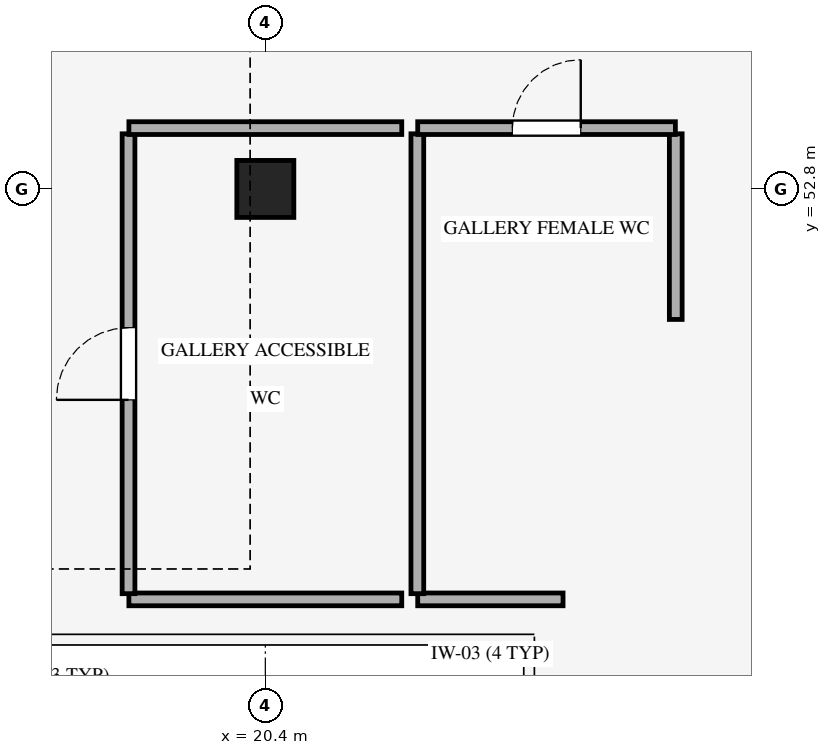
"""IFC4 building model, lengths in metres.
Left out: names, types, materials, properties, quantities, classifications, styles, units other than length and angle.
Written with IfcOpenShell. Run it as: python <this file> out.ifc"""

import sys

from ifc_helpers import new_model, si_unit, direction, frame, frame_2d, origin, origin_2d, place, context, subcontext, project, spatial, rectangle, extrude, element, fill, save


model = new_model("IFC4")
c1 = context("Model", 3, precision=1e-05, world=origin(), true_north=direction((0.0, 1.0)))
c2 = subcontext(c1, "Body", "Model", "MODEL_VIEW")
j1 = project(units=[si_unit("LENGTHUNIT", "METRE"), si_unit("PLANEANGLEUNIT", "RADIAN")], contexts=[c1])
p1 = place(None, origin())
s1 = spatial("IfcSite", under=j1, at=p1, CompositionType="ELEMENT")
p2 = place(p1, origin())
s2 = spatial("IfcBuilding", under=s1, at=p2, CompositionType="ELEMENT")
p3 = place(p2, frame((0.0, 0.0, 4.8)))
s3 = spatial("IfcBuildingStorey", under=s2, at=p3, CompositionType="ELEMENT", Elevation=4.8)
p4 = place(p3, frame((20.4, 52.8, 0.0), z_axis=(0.0, 0.0, 1.0), x_axis=(1.0, 0.0, 0.0)))
e1 = element("IfcColumn", 1, at=p4, inside=s3, PredefinedType="COLUMN", context=c2, shape_type="SweptSolid", body=[
    extrude(rectangle(XDim=0.75, YDim=0.75, at=origin_2d()), origin(), (0.0, 0.0, 1.0), 4.8),
])
p5 = place(p3, frame((25.8, 53.525, 0.0), z_axis=(0.0, 0.0, 1.0), x_axis=(0.0, -1.0, 0.0)))
e2 = element("IfcWall", 2, at=p5, inside=s3, PredefinedType="STANDARD", context=c2, shape_type="SweptSolid", body=[
    extrude(rectangle(XDim=2.442, YDim=0.168, at=frame_2d((1.221, 0.0))), origin(), (0.0, 0.0, 1.0), 4.54),
])
p6 = place(p3, frame((24.317, 47.4, 0.0), z_axis=(0.0, 0.0, 1.0), x_axis=(-1.0, 0.0, 0.0)))
e3 = element("IfcWall", 3, at=p6, inside=s3, PredefinedType="STANDARD", context=c2, shape_type="SweptSolid", body=[
    extrude(rectangle(XDim=1.912, YDim=0.168, at=frame_2d((0.956, 0.0))), origin(), (0.0, 0.0, 1.0), 4.54),
])
p7 = place(p3, frame((22.4, 47.475, 0.0), z_axis=(0.0, 0.0, 1.0), x_axis=(0.0, 1.0, 0.0)))
e4 = element("IfcWall", 4, at=p7, inside=s3, PredefinedType="STANDARD", context=c2, shape_type="SweptSolid", body=[
    extrude(rectangle(XDim=6.05, YDim=0.168, at=frame_2d((3.025, 0.0))), origin(), (0.0, 0.0, 1.0), 4.54),
])
p8 = place(p3, frame((22.405, 53.6, 0.0), z_axis=(0.0, 0.0, 1.0), x_axis=(1.0, 0.0, 0.0)))
e5 = element("IfcWall", 5, at=p8, inside=s3, PredefinedType="STANDARD", context=c2, shape_type="SweptSolid", body=[
    extrude(rectangle(XDim=3.39, YDim=0.168, at=frame_2d((1.695, 0.0))), origin(), (0.0, 0.0, 1.0), 4.54),
])
p9 = place(p8, frame((1.245, 0.0, 0.0)))
e6 = element("IfcOpeningElement", 6, at=p9, cuts=e5, PredefinedType="OPENING", context=c2, shape_type="SweptSolid", body=[
    extrude(rectangle(XDim=0.9, YDim=2.1, at=frame_2d((0.45, 1.05))), frame((0.0, 0.094, 0.0), z_axis=(0.0, -1.0, 0.0), x_axis=(1.0, 0.0, 0.0)), (0.0, 0.0, 1.0), 0.188),
])
p10 = place(p3, frame((22.195, 47.4, 0.0), z_axis=(0.0, 0.0, 1.0), x_axis=(-1.0, 0.0, 0.0)))
e7 = element("IfcWall", 7, at=p10, inside=s3, PredefinedType="STANDARD", context=c2, shape_type="SweptSolid", body=[
    extrude(rectangle(XDim=3.59, YDim=0.168, at=frame_2d((1.795, 0.0))), origin(), (0.0, 0.0, 1.0), 4.54),
])
p11 = place(p3, frame((18.6, 47.475, 0.0), z_axis=(0.0, 0.0, 1.0), x_axis=(0.0, 1.0, 0.0)))
e8 = element("IfcWall", 8, at=p11, inside=s3, PredefinedType="STANDARD", context=c2, shape_type="SweptSolid", body=[
    extrude(rectangle(XDim=6.05, YDim=0.168, at=frame_2d((3.025, 0.0))), origin(), (0.0, 0.0, 1.0), 4.54),
])
p12 = place(p11, frame((2.55, 0.0, 0.0)))
e9 = element("IfcOpeningElement", 9, at=p12, cuts=e8, PredefinedType="OPENING", context=c2, shape_type="SweptSolid", body=[
    extrude(rectangle(XDim=0.95, YDim=2.1, at=frame_2d((0.475, 1.05))), frame((0.0, 0.094, 0.0), z_axis=(0.0, -1.0, 0.0), x_axis=(1.0, 0.0, 0.0)), (0.0, 0.0, 1.0), 0.188),
])
p13 = place(p3, frame((18.605, 53.6, 0.0), z_axis=(0.0, 0.0, 1.0), x_axis=(1.0, 0.0, 0.0)))
e10 = element("IfcWall", 10, at=p13, inside=s3, PredefinedType="STANDARD", context=c2, shape_type="SweptSolid", body=[
    extrude(rectangle(XDim=3.59, YDim=0.168, at=frame_2d((1.795, 0.0))), origin(), (0.0, 0.0, 1.0), 4.54),
])
p14 = place(p9, origin())
e11 = element("IfcDoor", 11, at=p14, inside=s3, OperationType="SINGLE_SWING_RIGHT", PredefinedType="DOOR", context=c2, shape_type="SweptSolid", body=[
    extrude(rectangle(XDim=0.9, YDim=2.1, at=frame_2d((0.45, 1.05))), frame((0.0, 0.025, 0.0), z_axis=(0.0, -1.0, 0.0), x_axis=(1.0, 0.0, 0.0)), (0.0, 0.0, 1.0), 0.05),
])
fill(e6, e11)
p15 = place(p12, origin())
e12 = element("IfcDoor", 12, at=p15, inside=s3, OperationType="SINGLE_SWING_LEFT", PredefinedType="DOOR", context=c2, shape_type="SweptSolid", body=[
    extrude(rectangle(XDim=0.95, YDim=2.1, at=frame_2d((0.475, 1.05))), frame((0.0, 0.025, 0.0), z_axis=(0.0, -1.0, 0.0), x_axis=(1.0, 0.0, 0.0)), (0.0, 0.0, 1.0), 0.05),
])
fill(e9, e12)
save(model, sys.argv[1])
